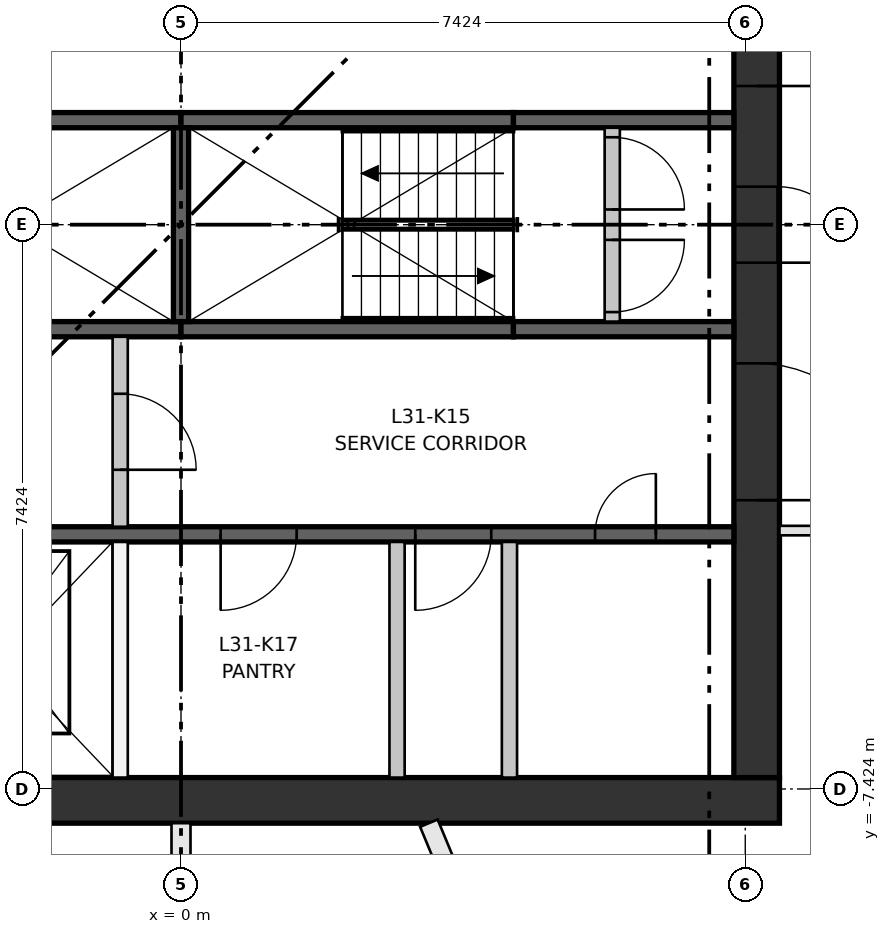
"""IFC4 building model, lengths in metres.
Left out: names, types, materials, properties, quantities, classifications, styles, units other than length and angle.
Written with IfcOpenShell. Run it as: python <this file> out.ifc"""

import sys

from ifc_helpers import new_model, si_unit, direction, frame, frame_2d, origin, place, context, subcontext, project, spatial, rectangle, extrude, element, fill, save


model = new_model("IFC4")
c1 = context("Model", 3, precision=1e-05, world=origin(), true_north=direction((0.0, 1.0)))
c2 = subcontext(c1, "Body", "Model", "MODEL_VIEW")
j1 = project(units=[si_unit("LENGTHUNIT", "METRE"), si_unit("PLANEANGLEUNIT", "RADIAN")], contexts=[c1])
p1 = place(None, origin())
s1 = spatial("IfcSite", under=j1, at=p1, CompositionType="ELEMENT")
p2 = place(p1, origin())
s2 = spatial("IfcBuilding", under=s1, at=p2, CompositionType="ELEMENT")
p3 = place(p2, frame((0.0, 0.0, 120.95)))
s3 = spatial("IfcBuildingStorey", under=s2, at=p3, CompositionType="ELEMENT", Elevation=120.95)
p4 = place(p3, frame((-7.874, -7.574, 0.0), z_axis=(0.0, 0.0, 1.0), x_axis=(1.0, 0.0, 0.0)))
e1 = element("IfcWall", 1, at=p4, inside=s3, PredefinedType="SHEAR", context=c2, shape_type="SweptSolid", body=[
    extrude(rectangle(XDim=15.748, YDim=0.6, at=frame_2d((7.874, 0.0))), origin(), (0.0, 0.0, 1.0), 3.35),
])
p5 = place(p3, frame((7.574, -7.274, 0.0), z_axis=(0.0, 0.0, 1.0), x_axis=(0.0, 1.0, 0.0)))
e2 = element("IfcWall", 2, at=p5, inside=s3, PredefinedType="SHEAR", context=c2, shape_type="SweptSolid", body=[
    extrude(rectangle(XDim=14.548, YDim=0.6, at=frame_2d((7.274, 0.0))), origin(), (0.0, 0.0, 1.0), 3.35),
])
p6 = place(p5, frame((6.774, 0.0, 0.0)))
e3 = element("IfcOpeningElement", 3, at=p6, cuts=e2, PredefinedType="OPENING", context=c2, shape_type="SweptSolid", body=[
    extrude(rectangle(XDim=1.0, YDim=2.1, at=frame_2d((0.5, 1.05))), frame((0.0, 0.31, 0.0), z_axis=(0.0, -1.0, 0.0), x_axis=(1.0, 0.0, 0.0)), (0.0, 0.0, 1.0), 0.62),
])
p7 = place(p5, frame((3.649, 0.0, 0.0)))
e4 = element("IfcOpeningElement", 4, at=p7, cuts=e2, PredefinedType="OPENING", context=c2, shape_type="SweptSolid", body=[
    extrude(rectangle(XDim=1.8, YDim=2.1, at=frame_2d((0.9, 1.05))), frame((0.0, 0.31, 0.0), z_axis=(0.0, -1.0, 0.0), x_axis=(1.0, 0.0, 0.0)), (0.0, 0.0, 1.0), 0.62),
])
p8 = place(p5, frame((9.098, 0.0, 0.0)))
e5 = element("IfcOpeningElement", 5, at=p8, cuts=e2, PredefinedType="OPENING", context=c2, shape_type="SweptSolid", body=[
    extrude(rectangle(XDim=1.8, YDim=2.1, at=frame_2d((0.9, 1.05))), frame((0.0, 0.31, 0.0), z_axis=(0.0, -1.0, 0.0), x_axis=(1.0, 0.0, 0.0)), (0.0, 0.0, 1.0), 0.62),
])
p9 = place(p3, frame((-7.274, -4.074, 0.0), z_axis=(0.0, 0.0, 1.0), x_axis=(1.0, 0.0, 0.0)))
e6 = element("IfcWall", 6, at=p9, inside=s3, PredefinedType="SHEAR", context=c2, shape_type="SweptSolid", body=[
    extrude(rectangle(XDim=14.548, YDim=0.2, at=frame_2d((7.274, 0.0))), origin(), (0.0, 0.0, 1.0), 3.0),
])
p10 = place(p9, frame((1.219, 0.0, 0.0)))
e7 = element("IfcOpeningElement", 7, at=p10, cuts=e6, PredefinedType="OPENING", context=c2, shape_type="SweptSolid", body=[
    extrude(rectangle(XDim=1.1, YDim=2.1, at=frame_2d((0.55, 1.05))), frame((0.0, 0.11, 0.0), z_axis=(0.0, -1.0, 0.0), x_axis=(1.0, 0.0, 0.0)), (0.0, 0.0, 1.0), 0.22),
])
p11 = place(p9, frame((4.355, 0.0, 0.0)))
e8 = element("IfcOpeningElement", 8, at=p11, cuts=e6, PredefinedType="OPENING", context=c2, shape_type="SweptSolid", body=[
    extrude(rectangle(XDim=1.1, YDim=2.1, at=frame_2d((0.55, 1.05))), frame((0.0, 0.11, 0.0), z_axis=(0.0, -1.0, 0.0), x_axis=(1.0, 0.0, 0.0)), (0.0, 0.0, 1.0), 0.22),
])
p12 = place(p9, frame((7.795, 0.0, 0.0)))
e9 = element("IfcOpeningElement", 9, at=p12, cuts=e6, PredefinedType="OPENING", context=c2, shape_type="SweptSolid", body=[
    extrude(rectangle(XDim=1.0, YDim=2.1, at=frame_2d((0.5, 1.05))), frame((0.0, 0.11, 0.0), z_axis=(0.0, -1.0, 0.0), x_axis=(1.0, 0.0, 0.0)), (0.0, 0.0, 1.0), 0.22),
])
p13 = place(p9, frame((10.356, 0.0, 0.0)))
e10 = element("IfcOpeningElement", 10, at=p13, cuts=e6, PredefinedType="OPENING", context=c2, shape_type="SweptSolid", body=[
    extrude(rectangle(XDim=1.0, YDim=2.1, at=frame_2d((0.5, 1.05))), frame((0.0, 0.11, 0.0), z_axis=(0.0, -1.0, 0.0), x_axis=(1.0, 0.0, 0.0)), (0.0, 0.0, 1.0), 0.22),
])
p14 = place(p9, frame((12.722, 0.0, 0.0)))
e11 = element("IfcOpeningElement", 11, at=p14, cuts=e6, PredefinedType="OPENING", context=c2, shape_type="SweptSolid", body=[
    extrude(rectangle(XDim=0.8, YDim=2.1, at=frame_2d((0.4, 1.05))), frame((0.0, 0.11, 0.0), z_axis=(0.0, -1.0, 0.0), x_axis=(1.0, 0.0, 0.0)), (0.0, 0.0, 1.0), 0.22),
])
for number, where, z_axis, x_axis in (
    (12, (-4.374, -1.375, 0.0), (0.0, 0.0, 1.0), (1.0, 0.0, 0.0)),
    (13, (0.0, -1.375, 0.0), (0.0, 0.0, 1.0), (1.0, 0.0, 0.0)),
):
    element("IfcWall", number, at=place(p3, frame(where, z_axis=z_axis, x_axis=x_axis)), inside=s3, PredefinedType="SHEAR", context=c2, shape_type="SweptSolid", body=[
        extrude(rectangle(XDim=4.374, YDim=0.2, at=frame_2d((2.187, 0.0))), origin(), (0.0, 0.0, 1.0), 3.0),
    ])
p15 = place(p3, frame((4.374, -1.375, 0.0), z_axis=(0.0, 0.0, 1.0), x_axis=(1.0, 0.0, 0.0)))
e14 = element("IfcWall", 14, at=p15, inside=s3, PredefinedType="SHEAR", context=c2, shape_type="SweptSolid", body=[
    extrude(rectangle(XDim=2.9, YDim=0.2, at=frame_2d((1.45, 0.0))), origin(), (0.0, 0.0, 1.0), 3.0),
])
for number, where, z_axis, x_axis in (
    (15, (-4.374, 1.375, 0.0), (0.0, 0.0, 1.0), (1.0, 0.0, 0.0)),
    (16, (0.0, 1.375, 0.0), (0.0, 0.0, 1.0), (1.0, 0.0, 0.0)),
):
    element("IfcWall", number, at=place(p3, frame(where, z_axis=z_axis, x_axis=x_axis)), inside=s3, PredefinedType="SHEAR", context=c2, shape_type="SweptSolid", body=[
        extrude(rectangle(XDim=4.374, YDim=0.2, at=frame_2d((2.187, 0.0))), origin(), (0.0, 0.0, 1.0), 3.0),
    ])
p16 = place(p3, frame((4.374, 1.375, 0.0), z_axis=(0.0, 0.0, 1.0), x_axis=(1.0, 0.0, 0.0)))
e17 = element("IfcWall", 17, at=p16, inside=s3, PredefinedType="SHEAR", context=c2, shape_type="SweptSolid", body=[
    extrude(rectangle(XDim=2.9, YDim=0.2, at=frame_2d((1.45, 0.0))), origin(), (0.0, 0.0, 1.0), 3.0),
])
p17 = place(p3, frame((0.0, -1.275, 0.0), z_axis=(0.0, 0.0, 1.0), x_axis=(0.0, 1.0, 0.0)))
e18 = element("IfcWall", 18, at=p17, inside=s3, PredefinedType="SHEAR", context=c2, shape_type="SweptSolid", body=[
    extrude(rectangle(XDim=2.55, YDim=0.2, at=frame_2d((1.275, 0.0))), origin(), (0.0, 0.0, 1.0), 3.0),
])
p18 = place(p3, frame((-0.8, -7.274, 0.0), z_axis=(0.0, 0.0, 1.0), x_axis=(0.0, 1.0, 0.0)))
e19 = element("IfcWall", 19, at=p18, inside=s3, PredefinedType="PARTITIONING", context=c2, shape_type="SweptSolid", body=[
    extrude(rectangle(XDim=3.1, YDim=0.2, at=frame_2d((1.55, 0.0))), origin(), (0.0, 0.0, 1.0), 3.0),
])
p19 = place(p3, frame((-0.8, -3.974, 0.0), z_axis=(0.0, 0.0, 1.0), x_axis=(0.0, 1.0, 0.0)))
e20 = element("IfcWall", 20, at=p19, inside=s3, PredefinedType="PARTITIONING", context=c2, shape_type="SweptSolid", body=[
    extrude(rectangle(XDim=2.499, YDim=0.2, at=frame_2d((1.25, 0.0))), origin(), (0.0, 0.0, 1.0), 3.0),
])
p20 = place(p19, frame((0.75, 0.0, 0.0)))
e21 = element("IfcOpeningElement", 21, at=p20, cuts=e20, PredefinedType="OPENING", context=c2, shape_type="SweptSolid", body=[
    extrude(rectangle(XDim=1.0, YDim=2.1, at=frame_2d((0.5, 1.05))), frame((0.0, 0.11, 0.0), z_axis=(0.0, -1.0, 0.0), x_axis=(1.0, 0.0, 0.0)), (0.0, 0.0, 1.0), 0.22),
])
for number, where, z_axis, x_axis in (
    (22, (2.843, -7.274, 0.0), (0.0, 0.0, 1.0), (0.0, 1.0, 0.0)),
    (23, (4.322, -7.274, 0.0), (0.0, 0.0, 1.0), (0.0, 1.0, 0.0)),
):
    element("IfcWall", number, at=place(p3, frame(where, z_axis=z_axis, x_axis=x_axis)), inside=s3, PredefinedType="PARTITIONING", context=c2, shape_type="SweptSolid", body=[
        extrude(rectangle(XDim=3.1, YDim=0.2, at=frame_2d((1.55, 0.0))), origin(), (0.0, 0.0, 1.0), 3.0),
    ])
p21 = place(p3, frame((5.674, -1.275, 0.0), z_axis=(0.0, 0.0, 1.0), x_axis=(0.0, 1.0, 0.0)))
e24 = element("IfcWall", 24, at=p21, inside=s3, PredefinedType="PARTITIONING", context=c2, shape_type="SweptSolid", body=[
    extrude(rectangle(XDim=2.55, YDim=0.2, at=frame_2d((1.275, 0.0))), origin(), (0.0, 0.0, 1.0), 3.0),
])
p22 = place(p21, frame((0.125, 0.0, 0.0)))
e25 = element("IfcOpeningElement", 25, at=p22, cuts=e24, PredefinedType="OPENING", context=c2, shape_type="SweptSolid", body=[
    extrude(rectangle(XDim=0.95, YDim=2.1, at=frame_2d((0.475, 1.05))), frame((0.0, 0.11, 0.0), z_axis=(0.0, -1.0, 0.0), x_axis=(1.0, 0.0, 0.0)), (0.0, 0.0, 1.0), 0.22),
])
p23 = place(p21, frame((1.475, 0.0, 0.0)))
e26 = element("IfcOpeningElement", 26, at=p23, cuts=e24, PredefinedType="OPENING", context=c2, shape_type="SweptSolid", body=[
    extrude(rectangle(XDim=0.95, YDim=2.1, at=frame_2d((0.475, 1.05))), frame((0.0, 0.11, 0.0), z_axis=(0.0, -1.0, 0.0), x_axis=(1.0, 0.0, 0.0)), (0.0, 0.0, 1.0), 0.22),
])
p24 = place(p3, frame((13.258, -4.024, 0.0), z_axis=(0.0, 0.0, 1.0), x_axis=(-1.0, 0.0, 0.0)))
e27 = element("IfcWall", 27, at=p24, inside=s3, PredefinedType="PARTITIONING", context=c2, shape_type="SweptSolid", body=[
    extrude(rectangle(XDim=5.384, YDim=0.125, at=frame_2d((2.692, 0.0))), origin(), (0.0, 0.0, 1.0), 3.0),
])
p25 = place(p24, frame((1.8, 0.0, 0.0)))
e28 = element("IfcOpeningElement", 28, at=p25, cuts=e27, PredefinedType="OPENING", context=c2, shape_type="SweptSolid", body=[
    extrude(rectangle(XDim=1.8, YDim=2.1, at=frame_2d((0.9, 1.05))), frame((0.0, 0.073, 0.0), z_axis=(0.0, -1.0, 0.0), x_axis=(1.0, 0.0, 0.0)), (0.0, 0.0, 1.0), 0.145),
])
p26 = place(p3, frame((0.0, -7.874, 0.0), z_axis=(0.0, 0.0, 1.0), x_axis=(0.0, -1.0, 0.0)))
e29 = element("IfcWall", 29, at=p26, inside=s3, PredefinedType="PARTITIONING", context=c2, shape_type="SweptSolid", body=[
    extrude(rectangle(XDim=7.255, YDim=0.25, at=frame_2d((3.627, 0.0))), origin(), (0.0, 0.0, 1.0), 3.0),
])
p27 = place(p3, frame((5.84, -14.098, 0.0), z_axis=(0.0, 0.0, 1.0), x_axis=(-0.382671840259, 0.923884334034, 0.0)))
e30 = element("IfcWall", 30, at=p27, inside=s3, PredefinedType="PARTITIONING", context=c2, shape_type="SweptSolid", body=[
    extrude(rectangle(XDim=6.737, YDim=0.25, at=frame_2d((3.369, 0.0))), origin(), (0.0, 0.0, 1.0), 3.0),
])
p28 = place(p27, frame((2.9, 0.0, 0.0)))
e31 = element("IfcOpeningElement", 31, at=p28, cuts=e30, PredefinedType="OPENING", context=c2, shape_type="SweptSolid", body=[
    extrude(rectangle(XDim=1.0, YDim=2.1, at=frame_2d((0.5, 1.05))), frame((0.0, 0.135, 0.0), z_axis=(0.0, -1.0, 0.0), x_axis=(1.0, 0.0, 0.0)), (0.0, 0.0, 1.0), 0.27),
])
p29 = place(p22, frame((0.95, 0.0, 0.0), z_axis=(0.0, 0.0, 1.0), x_axis=(-1.0, 0.0, 0.0)))
e32 = element("IfcDoor", 32, at=p29, inside=s3, OperationType="SINGLE_SWING_RIGHT", PredefinedType="DOOR", context=c2, shape_type="SweptSolid", body=[
    extrude(rectangle(XDim=0.95, YDim=2.1, at=frame_2d((0.475, 1.05))), frame((0.0, 0.025, 0.0), z_axis=(0.0, -1.0, 0.0), x_axis=(1.0, 0.0, 0.0)), (0.0, 0.0, 1.0), 0.05),
])
fill(e25, e32)
p30 = place(p23, frame((0.95, 0.0, 0.0), z_axis=(0.0, 0.0, 1.0), x_axis=(-1.0, 0.0, 0.0)))
e33 = element("IfcDoor", 33, at=p30, inside=s3, OperationType="SINGLE_SWING_LEFT", PredefinedType="DOOR", context=c2, shape_type="SweptSolid", body=[
    extrude(rectangle(XDim=0.95, YDim=2.1, at=frame_2d((0.475, 1.05))), frame((0.0, 0.025, 0.0), z_axis=(0.0, -1.0, 0.0), x_axis=(1.0, 0.0, 0.0)), (0.0, 0.0, 1.0), 0.05),
])
fill(e26, e33)
p31 = place(p20, frame((1.0, 0.0, 0.0), z_axis=(0.0, 0.0, 1.0), x_axis=(-1.0, 0.0, 0.0)))
e34 = element("IfcDoor", 34, at=p31, inside=s3, OperationType="SINGLE_SWING_LEFT", PredefinedType="DOOR", context=c2, shape_type="SweptSolid", body=[
    extrude(rectangle(XDim=1.0, YDim=2.1, at=frame_2d((0.5, 1.05))), frame((0.0, 0.025, 0.0), z_axis=(0.0, -1.0, 0.0), x_axis=(1.0, 0.0, 0.0)), (0.0, 0.0, 1.0), 0.05),
])
fill(e21, e34)
p32 = place(p12, frame((1.0, 0.0, 0.0), z_axis=(0.0, 0.0, 1.0), x_axis=(-1.0, 0.0, 0.0)))
e35 = element("IfcDoor", 35, at=p32, inside=s3, OperationType="SINGLE_SWING_LEFT", PredefinedType="DOOR", context=c2, shape_type="SweptSolid", body=[
    extrude(rectangle(XDim=1.0, YDim=2.1, at=frame_2d((0.5, 1.05))), frame((0.0, 0.025, 0.0), z_axis=(0.0, -1.0, 0.0), x_axis=(1.0, 0.0, 0.0)), (0.0, 0.0, 1.0), 0.05),
])
fill(e9, e35)
p33 = place(p13, frame((1.0, 0.0, 0.0), z_axis=(0.0, 0.0, 1.0), x_axis=(-1.0, 0.0, 0.0)))
e36 = element("IfcDoor", 36, at=p33, inside=s3, OperationType="SINGLE_SWING_LEFT", PredefinedType="DOOR", context=c2, shape_type="SweptSolid", body=[
    extrude(rectangle(XDim=1.0, YDim=2.1, at=frame_2d((0.5, 1.05))), frame((0.0, 0.025, 0.0), z_axis=(0.0, -1.0, 0.0), x_axis=(1.0, 0.0, 0.0)), (0.0, 0.0, 1.0), 0.05),
])
fill(e10, e36)
p34 = place(p14, origin())
e37 = element("IfcDoor", 37, at=p34, inside=s3, OperationType="SINGLE_SWING_RIGHT", PredefinedType="DOOR", context=c2, shape_type="SweptSolid", body=[
    extrude(rectangle(XDim=0.8, YDim=2.1, at=frame_2d((0.4, 1.05))), frame((0.0, 0.025, 0.0), z_axis=(0.0, -1.0, 0.0), x_axis=(1.0, 0.0, 0.0)), (0.0, 0.0, 1.0), 0.05),
])
fill(e11, e37)
p35 = place(p6, frame((1.0, 0.0, 0.0), z_axis=(0.0, 0.0, 1.0), x_axis=(-1.0, 0.0, 0.0)))
e38 = element("IfcDoor", 38, at=p35, inside=s3, OperationType="SINGLE_SWING_LEFT", PredefinedType="DOOR", context=c2, shape_type="SweptSolid", body=[
    extrude(rectangle(XDim=1.0, YDim=2.1, at=frame_2d((0.5, 1.05))), frame((0.0, 0.3, 0.0), z_axis=(0.0, -1.0, 0.0), x_axis=(1.0, 0.0, 0.0)), (0.0, 0.0, 1.0), 0.05),
])
fill(e3, e38)
p36 = place(p7, frame((1.8, 0.0, 0.0), z_axis=(0.0, 0.0, 1.0), x_axis=(-1.0, 0.0, 0.0)))
e39 = element("IfcDoor", 39, at=p36, inside=s3, OperationType="DOUBLE_DOOR_SINGLE_SWING", PredefinedType="DOOR", context=c2, shape_type="SweptSolid", body=[
    extrude(rectangle(XDim=1.8, YDim=2.1, at=frame_2d((0.9, 1.05))), frame((0.0, 0.025, 0.0), z_axis=(0.0, -1.0, 0.0), x_axis=(1.0, 0.0, 0.0)), (0.0, 0.0, 1.0), 0.05),
])
fill(e4, e39)
p37 = place(p8, frame((1.8, 0.0, 0.0), z_axis=(0.0, 0.0, 1.0), x_axis=(-1.0, 0.0, 0.0)))
e40 = element("IfcDoor", 40, at=p37, inside=s3, OperationType="DOUBLE_DOOR_SINGLE_SWING", PredefinedType="DOOR", context=c2, shape_type="SweptSolid", body=[
    extrude(rectangle(XDim=1.8, YDim=2.1, at=frame_2d((0.9, 1.05))), frame((0.0, 0.025, 0.0), z_axis=(0.0, -1.0, 0.0), x_axis=(1.0, 0.0, 0.0)), (0.0, 0.0, 1.0), 0.05),
])
fill(e5, e40)
save(model, sys.argv[1])
